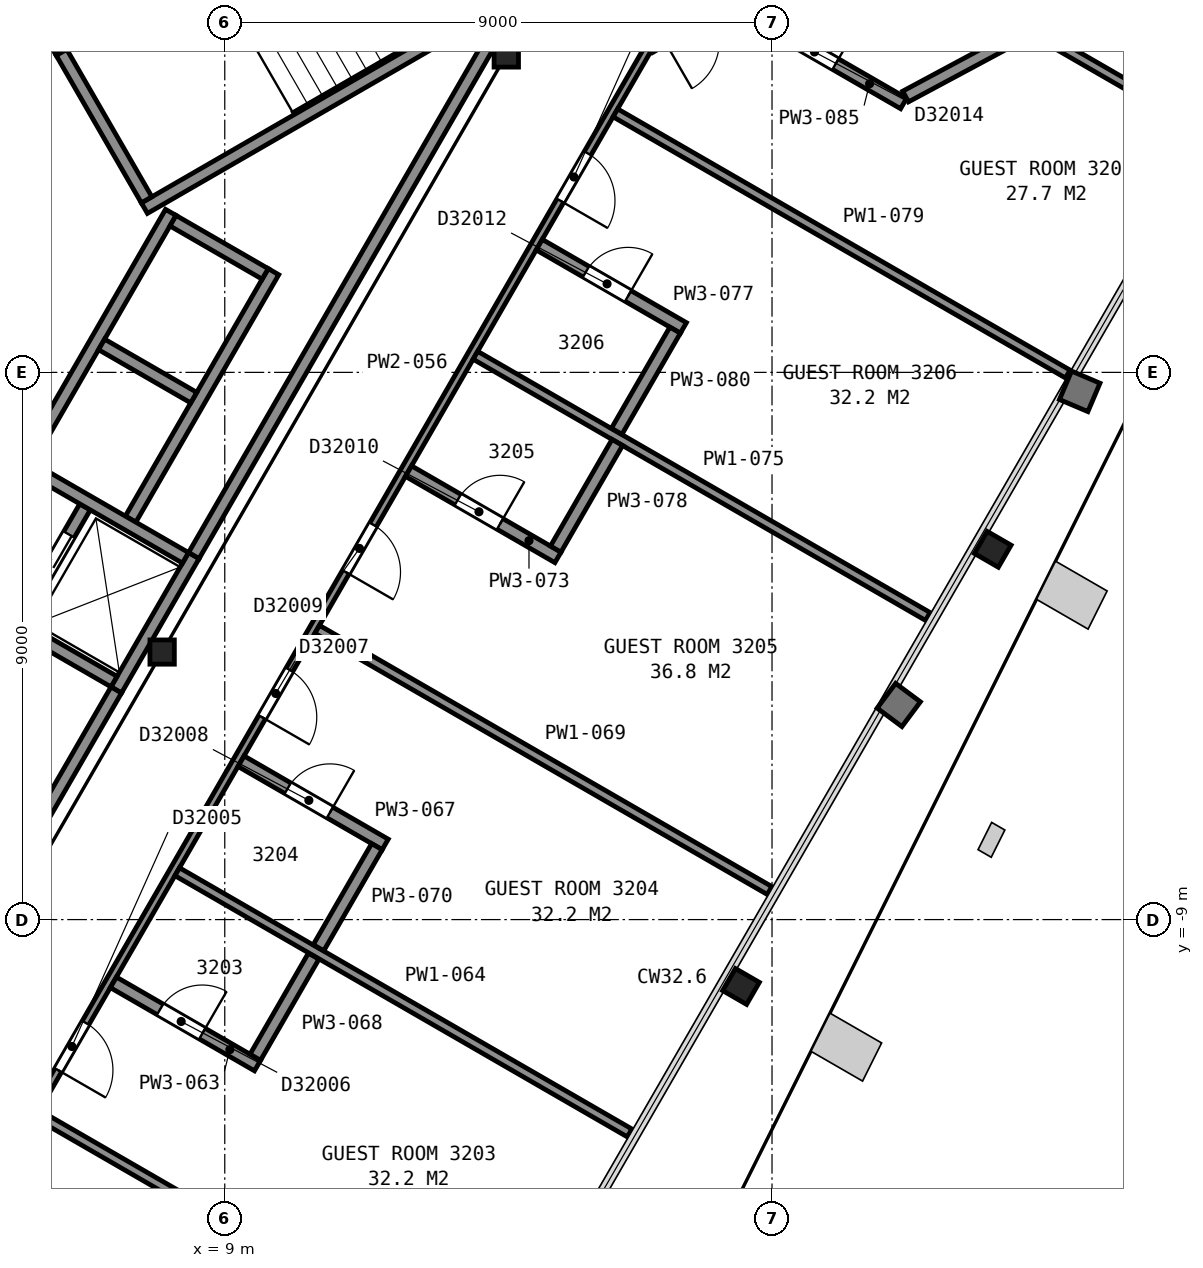
"""IFC4 building model, lengths in metres.
Left out: names, types, materials, properties, quantities, classifications, styles, units other than length and angle.
Written with IfcOpenShell. Run it as: python <this file> out.ifc"""

import sys

from ifc_helpers import new_model, si_unit, direction, frame, frame_2d, origin, origin_2d, place, context, subcontext, project, spatial, rectangle, i_section, extrude, element, fill, save


model = new_model("IFC4")
c1 = context("Model", 3, precision=1e-05, world=origin(), true_north=direction((0.0, 1.0)))
c2 = subcontext(c1, "Body", "Model", "MODEL_VIEW")
j1 = project(units=[si_unit("LENGTHUNIT", "METRE"), si_unit("PLANEANGLEUNIT", "RADIAN")], contexts=[c1])
p1 = place(None, origin())
s1 = spatial("IfcSite", under=j1, at=p1, CompositionType="ELEMENT")
p2 = place(p1, origin())
s2 = spatial("IfcBuilding", under=s1, at=p2, CompositionType="ELEMENT")
p3 = place(p2, frame((0.0, 0.0, 132.4)))
s3 = spatial("IfcBuildingStorey", under=s2, at=p3, CompositionType="ELEMENT", Elevation=132.4)
p4 = place(p3, frame((17.49, -10.1, 0.035), z_axis=(0.0, 0.0, 1.0), x_axis=(-0.5, -0.866025403784, 0.0)))
e1 = element("IfcColumn", 1, at=p4, inside=s3, PredefinedType="COLUMN", context=c2, shape_type="SweptSolid", body=[
    extrude(i_section(OverallWidth=0.419, OverallDepth=0.455, WebThickness=0.042, FlangeThickness=0.068, FilletRadius=0.015, at=origin_2d()), origin(), (0.0, 0.0, 1.0), 3.565),
])
p5 = place(p3, frame((21.63, -2.91, 0.04), z_axis=(0.0, 0.0, 1.0), x_axis=(-0.5, -0.866025403784, 0.0)))
e2 = element("IfcColumn", 2, at=p5, inside=s3, PredefinedType="COLUMN", context=c2, shape_type="SweptSolid", body=[
    extrude(i_section(OverallWidth=0.419, OverallDepth=0.455, WebThickness=0.042, FlangeThickness=0.068, FilletRadius=0.015, at=origin_2d()), origin(), (0.0, 0.0, 1.0), 3.56),
])
for number, where, z_axis, x_axis in (
    (3, (13.63, 5.22, 0.0), (0.0, 0.0, 1.0), (1.0, 0.0, 0.0)),
    (4, (7.97, -4.6, 0.0), (0.0, 0.0, 1.0), (1.0, 0.0, 0.0)),
):
    element("IfcColumn", number, at=place(p3, frame(where, z_axis=z_axis, x_axis=x_axis)), inside=s3, PredefinedType="COLUMN", context=c2, shape_type="SweptSolid", body=[
        extrude(i_section(OverallWidth=0.401, OverallDepth=0.399, WebThickness=0.025, FlangeThickness=0.04, FilletRadius=0.015, at=origin_2d()), origin(), (0.0, 0.0, 1.0), 3.6),
    ])
for number, where, z_axis, x_axis in (
    (5, (6.178, 5.299, 0.0), (0.0, 0.0, 1.0), (0.866, 0.5, 0.0)),
    (6, (7.678, 2.701, 0.0), (0.0, 0.0, 1.0), (0.866, 0.5, 0.0)),
):
    element("IfcWall", number, at=place(p3, frame(where, z_axis=z_axis, x_axis=x_axis)), inside=s3, PredefinedType="PARTITIONING", context=c2, shape_type="SweptSolid", body=[
        extrude(rectangle(XDim=12.0, YDim=0.2, at=frame_2d((6.0, 0.0))), origin(), (0.0, 0.0, 1.0), 3.35),
    ])
p6 = place(p3, frame((7.715, 2.838, 0.0), z_axis=(0.0, 0.0, 1.0), x_axis=(-0.500049511043, 0.865996816683, 0.0)))
e7 = element("IfcWall", 7, at=p6, inside=s3, PredefinedType="PARTITIONING", context=c2, shape_type="SweptSolid", body=[
    extrude(rectangle(XDim=2.8, YDim=0.2, at=frame_2d((1.4, 0.0))), origin(), (0.0, 0.0, 1.0), 3.35),
])
p7 = place(p3, frame((7.216, -5.222, 0.0), z_axis=(0.0, 0.0, 1.0), x_axis=(0.499990435942, 0.866030925526, 0.0)))
e8 = element("IfcWall", 8, at=p7, inside=s3, PredefinedType="PARTITIONING", context=c2, shape_type="SweptSolid", body=[
    extrude(rectangle(XDim=2.55, YDim=0.2, at=frame_2d((1.275, 0.0))), origin(), (0.0, 0.0, 1.0), 3.6),
])
p8 = place(p3, frame((7.451, -2.414, 0.0), z_axis=(0.0, 0.0, 1.0), x_axis=(0.500016218704, 0.866016039709, 0.0)))
e9 = element("IfcWall", 9, at=p8, inside=s3, PredefinedType="PARTITIONING", context=c2, shape_type="SweptSolid", body=[
    extrude(rectangle(XDim=4.7, YDim=0.2, at=frame_2d((2.35, 0.0))), origin(), (0.0, 0.0, 1.0), 3.6),
])
p9 = place(p3, frame((5.527, -4.247, 0.0), z_axis=(0.0, 0.0, 1.0), x_axis=(0.499938297808, 0.866061024631, 0.0)))
e10 = element("IfcWall", 10, at=p9, inside=s3, PredefinedType="PARTITIONING", context=c2, shape_type="SweptSolid", body=[
    extrude(rectangle(XDim=2.35, YDim=0.2, at=frame_2d((1.175, 0.0))), origin(), (0.0, 0.0, 1.0), 3.6),
])
p10 = place(p9, frame((0.725, 0.0, 0.0)))
e11 = element("IfcOpeningElement", 11, at=p10, cuts=e10, PredefinedType="OPENING", context=c2, shape_type="SweptSolid", body=[
    extrude(rectangle(XDim=1.1, YDim=2.1, at=frame_2d((0.55, 1.05))), frame((0.0, 0.11, 0.0), z_axis=(0.0, -1.0, 0.0), x_axis=(1.0, 0.0, 0.0)), (0.0, 0.0, 1.0), 0.22),
])
p11 = place(p3, frame((5.663, -1.612, 0.0), z_axis=(0.0, 0.0, 1.0), x_axis=(0.49998122708, 0.866036242063, 0.0)))
e12 = element("IfcWall", 12, at=p11, inside=s3, PredefinedType="PARTITIONING", context=c2, shape_type="SweptSolid", body=[
    extrude(rectangle(XDim=4.9, YDim=0.2, at=frame_2d((2.45, 0.0))), origin(), (0.0, 0.0, 1.0), 3.6),
])
p12 = place(p3, frame((9.665, 1.62, 0.0), z_axis=(0.0, 0.0, 1.0), x_axis=(-0.866002029911, 0.500040482552, 0.0)))
e13 = element("IfcWall", 13, at=p12, inside=s3, PredefinedType="PARTITIONING", context=c2, shape_type="SweptSolid", body=[
    extrude(rectangle(XDim=1.75, YDim=0.2, at=frame_2d((0.875, 0.0))), origin(), (0.0, 0.0, 1.0), 3.6),
])
p13 = place(p3, frame((8.49, -0.416, 0.0), z_axis=(0.0, 0.0, 1.0), x_axis=(-0.866036909293, 0.499980071345, 0.0)))
e14 = element("IfcWall", 14, at=p13, inside=s3, PredefinedType="PARTITIONING", context=c2, shape_type="SweptSolid", body=[
    extrude(rectangle(XDim=1.75, YDim=0.2, at=frame_2d((0.875, 0.0))), origin(), (0.0, 0.0, 1.0), 3.6),
])
p14 = place(p3, frame((8.354, -3.051, 0.0), z_axis=(0.0, 0.0, 1.0), x_axis=(-0.866060182126, 0.499939757307, 0.0)))
e15 = element("IfcWall", 15, at=p14, inside=s3, PredefinedType="PARTITIONING", context=c2, shape_type="SweptSolid", body=[
    extrude(rectangle(XDim=2.95, YDim=0.2, at=frame_2d((1.475, 0.0))), origin(), (0.0, 0.0, 1.0), 3.6),
])
p15 = place(p3, frame((7.179, -5.086, 0.0), z_axis=(0.0, 0.0, 1.0), x_axis=(-0.866036909293, 0.499980071345, 0.0)))
e16 = element("IfcWall", 16, at=p15, inside=s3, PredefinedType="PARTITIONING", context=c2, shape_type="SweptSolid", body=[
    extrude(rectangle(XDim=1.75, YDim=0.2, at=frame_2d((0.875, 0.0))), origin(), (0.0, 0.0, 1.0), 3.6),
])
p16 = place(p3, frame((5.906, -7.49, 0.0), z_axis=(0.0, 0.0, 1.0), x_axis=(0.500252727967, 0.865879442048, 0.0)))
e17 = element("IfcWall", 17, at=p16, inside=s3, PredefinedType="PARTITIONING", context=c2, shape_type="SweptSolid", body=[
    extrude(rectangle(XDim=2.617, YDim=0.2, at=frame_2d((1.309, 0.0))), origin(), (0.0, 0.0, 1.0), 3.35),
])
p17 = place(p3, frame((8.492, -3.012, 0.0), z_axis=(0.0, 0.0, 1.0), x_axis=(0.499972957231, 0.866041016371, 0.0)))
e18 = element("IfcWall", 18, at=p17, inside=s3, PredefinedType="PARTITIONING", context=c2, shape_type="SweptSolid", body=[
    extrude(rectangle(XDim=10.349, YDim=0.2, at=frame_2d((5.174, 0.0))), origin(), (0.0, 0.0, 1.0), 3.35),
])
p18 = place(p3, frame((15.962, 5.326, 0.0), z_axis=(0.0, 0.0, 1.0), x_axis=(-0.499992829944, -0.866029543379, 0.0)))
e19 = element("IfcWall", 19, at=p18, inside=s3, PredefinedType="PARTITIONING", context=c2, shape_type="SweptSolid", body=[
    extrude(rectangle(XDim=24.413, YDim=0.125, at=frame_2d((12.207, 0.0))), origin(), (0.0, 0.0, 1.0), 2.613),
])
p19 = place(p18, frame((21.258, 0.0, 0.0)))
e20 = element("IfcOpeningElement", 20, at=p19, cuts=e19, PredefinedType="OPENING", context=c2, shape_type="SweptSolid", body=[
    extrude(rectangle(XDim=0.9, YDim=2.1, at=frame_2d((0.45, 1.05))), frame((0.0, 0.073, 0.0), z_axis=(0.0, -1.0, 0.0), x_axis=(1.0, 0.0, 0.0)), (0.0, 0.0, 1.0), 0.145),
])
p20 = place(p18, frame((18.502, 0.0, 0.0)))
e21 = element("IfcOpeningElement", 21, at=p20, cuts=e19, PredefinedType="OPENING", context=c2, shape_type="SweptSolid", body=[
    extrude(rectangle(XDim=0.9, YDim=2.1, at=frame_2d((0.45, 1.05))), frame((0.0, 0.073, 0.0), z_axis=(0.0, -1.0, 0.0), x_axis=(1.0, 0.0, 0.0)), (0.0, 0.0, 1.0), 0.145),
])
p21 = place(p18, frame((11.799, 0.0, 0.0)))
e22 = element("IfcOpeningElement", 22, at=p21, cuts=e19, PredefinedType="OPENING", context=c2, shape_type="SweptSolid", body=[
    extrude(rectangle(XDim=0.9, YDim=2.1, at=frame_2d((0.45, 1.05))), frame((0.0, 0.073, 0.0), z_axis=(0.0, -1.0, 0.0), x_axis=(1.0, 0.0, 0.0)), (0.0, 0.0, 1.0), 0.145),
])
p22 = place(p18, frame((9.043, 0.0, 0.0)))
e23 = element("IfcOpeningElement", 23, at=p22, cuts=e19, PredefinedType="OPENING", context=c2, shape_type="SweptSolid", body=[
    extrude(rectangle(XDim=0.9, YDim=2.1, at=frame_2d((0.45, 1.05))), frame((0.0, 0.073, 0.0), z_axis=(0.0, -1.0, 0.0), x_axis=(1.0, 0.0, 0.0)), (0.0, 0.0, 1.0), 0.145),
])
p23 = place(p18, frame((1.99, 0.0, 0.0)))
e24 = element("IfcOpeningElement", 24, at=p23, cuts=e19, PredefinedType="OPENING", context=c2, shape_type="SweptSolid", body=[
    extrude(rectangle(XDim=0.9, YDim=2.1, at=frame_2d((0.45, 1.05))), frame((0.0, 0.073, 0.0), z_axis=(0.0, -1.0, 0.0), x_axis=(1.0, 0.0, 0.0)), (0.0, 0.0, 1.0), 0.145),
])
p24 = place(p3, frame((5.916, -12.201, 0.0), z_axis=(0.0, 0.0, 1.0), x_axis=(0.865995804368, -0.50005126419, 0.0)))
e25 = element("IfcWall", 25, at=p24, inside=s3, PredefinedType="PARTITIONING", context=c2, shape_type="SweptSolid", body=[
    extrude(rectangle(XDim=8.591, YDim=0.15, at=frame_2d((4.295, 0.0))), origin(), (0.0, 0.0, 1.0), 2.613),
])
p25 = place(p3, frame((7.168, -10.032, 0.0), z_axis=(0.0, 0.0, 1.0), x_axis=(0.86596722502, -0.50010075504, 0.0)))
e26 = element("IfcWall", 26, at=p25, inside=s3, PredefinedType="PARTITIONING", context=c2, shape_type="SweptSolid", body=[
    extrude(rectangle(XDim=2.737, YDim=0.2, at=frame_2d((1.369, 0.0))), origin(), (0.0, 0.0, 1.0), 2.613),
])
p26 = place(p25, frame((0.887, 0.0, 0.0)))
e27 = element("IfcOpeningElement", 27, at=p26, cuts=e26, PredefinedType="OPENING", context=c2, shape_type="SweptSolid", body=[
    extrude(rectangle(XDim=0.8, YDim=2.1, at=frame_2d((0.4, 1.05))), frame((0.0, 0.11, 0.0), z_axis=(0.0, -1.0, 0.0), x_axis=(1.0, 0.0, 0.0)), (0.0, 0.0, 1.0), 0.22),
])
p27 = place(p3, frame((8.218, -8.213, 0.0), z_axis=(0.0, 0.0, 1.0), x_axis=(0.865997709989, -0.500047963993, 0.0)))
e28 = element("IfcWall", 28, at=p27, inside=s3, PredefinedType="PARTITIONING", context=c2, shape_type="SweptSolid", body=[
    extrude(rectangle(XDim=8.592, YDim=0.15, at=frame_2d((4.296, 0.0))), origin(), (0.0, 0.0, 1.0), 2.613),
])
p28 = place(p3, frame((11.639, -7.764, 0.0), z_axis=(0.0, 0.0, 1.0), x_axis=(-0.866028150195, 0.499995243048, 0.0)))
e29 = element("IfcWall", 29, at=p28, inside=s3, PredefinedType="PARTITIONING", context=c2, shape_type="SweptSolid", body=[
    extrude(rectangle(XDim=2.737, YDim=0.2, at=frame_2d((1.369, 0.0))), origin(), (0.0, 0.0, 1.0), 2.613),
])
p29 = place(p28, frame((1.05, 0.0, 0.0)))
e30 = element("IfcOpeningElement", 30, at=p29, cuts=e29, PredefinedType="OPENING", context=c2, shape_type="SweptSolid", body=[
    extrude(rectangle(XDim=0.8, YDim=2.1, at=frame_2d((0.4, 1.05))), frame((0.0, 0.11, 0.0), z_axis=(0.0, -1.0, 0.0), x_axis=(1.0, 0.0, 0.0)), (0.0, 0.0, 1.0), 0.22),
])
p30 = place(p3, frame((9.502, -11.264, 0.0), z_axis=(0.0, 0.0, 1.0), x_axis=(0.499887618105, 0.86609027778, 0.0)))
e31 = element("IfcWall", 31, at=p30, inside=s3, PredefinedType="PARTITIONING", context=c2, shape_type="SweptSolid", body=[
    extrude(rectangle(XDim=1.919, YDim=0.2, at=frame_2d((0.96, 0.0))), origin(), (0.0, 0.0, 1.0), 2.613),
])
p31 = place(p3, frame((10.52, -4.226, 0.0), z_axis=(0.0, 0.0, 1.0), x_axis=(0.866002910178, -0.500038958046, 0.0)))
e32 = element("IfcWall", 32, at=p31, inside=s3, PredefinedType="PARTITIONING", context=c2, shape_type="SweptSolid", body=[
    extrude(rectangle(XDim=8.591, YDim=0.15, at=frame_2d((4.295, 0.0))), origin(), (0.0, 0.0, 1.0), 2.613),
])
p32 = place(p3, frame((10.542, -9.463, 0.0), z_axis=(0.0, 0.0, 1.0), x_axis=(0.500214044309, 0.865901789971, 0.0)))
e33 = element("IfcWall", 33, at=p32, inside=s3, PredefinedType="PARTITIONING", context=c2, shape_type="SweptSolid", body=[
    extrude(rectangle(XDim=1.92, YDim=0.2, at=frame_2d((0.96, 0.0))), origin(), (0.0, 0.0, 1.0), 2.613),
])
p33 = place(p3, frame((12.022, -1.624, 0.0), z_axis=(0.0, 0.0, 1.0), x_axis=(0.866026538634, -0.499998034377, 0.0)))
e34 = element("IfcWall", 34, at=p33, inside=s3, PredefinedType="PARTITIONING", context=c2, shape_type="SweptSolid", body=[
    extrude(rectangle(XDim=2.837, YDim=0.2, at=frame_2d((1.419, 0.0))), origin(), (0.0, 0.0, 1.0), 2.613),
])
p34 = place(p33, frame((0.938, 0.0, 0.0)))
e35 = element("IfcOpeningElement", 35, at=p34, cuts=e34, PredefinedType="OPENING", context=c2, shape_type="SweptSolid", body=[
    extrude(rectangle(XDim=0.8, YDim=2.1, at=frame_2d((0.4, 1.05))), frame((0.0, 0.11, 0.0), z_axis=(0.0, -1.0, 0.0), x_axis=(1.0, 0.0, 0.0)), (0.0, 0.0, 1.0), 0.22),
])
p35 = place(p3, frame((13.122, 0.281, 0.0), z_axis=(0.0, 0.0, 1.0), x_axis=(0.866029425019, -0.499993034952, 0.0)))
e36 = element("IfcWall", 36, at=p35, inside=s3, PredefinedType="PARTITIONING", context=c2, shape_type="SweptSolid", body=[
    extrude(rectangle(XDim=8.591, YDim=0.15, at=frame_2d((4.296, 0.0))), origin(), (0.0, 0.0, 1.0), 2.613),
])
p36 = place(p3, frame((16.542, 0.731, 0.0), z_axis=(0.0, 0.0, 1.0), x_axis=(-0.86596722502, 0.50010075504, 0.0)))
e37 = element("IfcWall", 37, at=p36, inside=s3, PredefinedType="PARTITIONING", context=c2, shape_type="SweptSolid", body=[
    extrude(rectangle(XDim=2.737, YDim=0.2, at=frame_2d((1.369, 0.0))), origin(), (0.0, 0.0, 1.0), 2.613),
])
p37 = place(p36, frame((1.05, 0.0, 0.0)))
e38 = element("IfcOpeningElement", 38, at=p37, cuts=e37, PredefinedType="OPENING", context=c2, shape_type="SweptSolid", body=[
    extrude(rectangle(XDim=0.8, YDim=2.1, at=frame_2d((0.4, 1.05))), frame((0.0, 0.11, 0.0), z_axis=(0.0, -1.0, 0.0), x_axis=(1.0, 0.0, 0.0)), (0.0, 0.0, 1.0), 0.22),
])
p38 = place(p3, frame((14.443, -2.906, 0.0), z_axis=(0.0, 0.0, 1.0), x_axis=(0.500042536776, 0.866000843773, 0.0)))
e39 = element("IfcWall", 39, at=p38, inside=s3, PredefinedType="PARTITIONING", context=c2, shape_type="SweptSolid", body=[
    extrude(rectangle(XDim=2.025, YDim=0.2, at=frame_2d((1.012, 0.0))), origin(), (0.0, 0.0, 1.0), 2.613),
])
p39 = place(p3, frame((15.424, 4.268, 0.0), z_axis=(0.0, 0.0, 1.0), x_axis=(0.866022320763, -0.500005339912, 0.0)))
e40 = element("IfcWall", 40, at=p39, inside=s3, PredefinedType="PARTITIONING", context=c2, shape_type="SweptSolid", body=[
    extrude(rectangle(XDim=8.591, YDim=0.15, at=frame_2d((4.296, 0.0))), origin(), (0.0, 0.0, 1.0), 2.613),
])
p40 = place(p3, frame((15.446, -0.969, 0.0), z_axis=(0.0, 0.0, 1.0), x_axis=(0.499913221443, 0.866075499611, 0.0)))
e41 = element("IfcWall", 41, at=p40, inside=s3, PredefinedType="PARTITIONING", context=c2, shape_type="SweptSolid", body=[
    extrude(rectangle(XDim=1.92, YDim=0.2, at=frame_2d((0.96, 0.0))), origin(), (0.0, 0.0, 1.0), 2.613),
])
p41 = place(p3, frame((19.278, 7.204, 0.0), z_axis=(0.0, 0.0, 1.0), x_axis=(-0.866028547684, -0.499994554566, 0.0)))
e42 = element("IfcWall", 42, at=p41, inside=s3, PredefinedType="PARTITIONING", context=c2, shape_type="SweptSolid", body=[
    extrude(rectangle(XDim=3.78, YDim=0.125, at=frame_2d((1.89, 0.0))), origin(), (0.0, 0.0, 1.0), 2.613),
])
p42 = place(p41, frame((2.615, 0.0, 0.0)))
e43 = element("IfcOpeningElement", 43, at=p42, cuts=e42, PredefinedType="OPENING", context=c2, shape_type="SweptSolid", body=[
    extrude(rectangle(XDim=0.9, YDim=2.1, at=frame_2d((0.45, 1.05))), frame((0.0, 0.073, 0.0), z_axis=(0.0, -1.0, 0.0), x_axis=(1.0, 0.0, 0.0)), (0.0, 0.0, 1.0), 0.145),
])
p43 = place(p3, frame((17.425, 6.004, 0.0), z_axis=(0.0, 0.0, 1.0), x_axis=(0.866145753309, -0.499791490549, 0.0)))
e44 = element("IfcWall", 44, at=p43, inside=s3, PredefinedType="PARTITIONING", context=c2, shape_type="SweptSolid", body=[
    extrude(rectangle(XDim=3.163, YDim=0.2, at=frame_2d((1.582, 0.0))), origin(), (0.0, 0.0, 1.0), 2.613),
])
p44 = place(p43, frame((1.07, 0.0, 0.0)))
e45 = element("IfcOpeningElement", 45, at=p44, cuts=e44, PredefinedType="OPENING", context=c2, shape_type="SweptSolid", body=[
    extrude(rectangle(XDim=0.8, YDim=2.1, at=frame_2d((0.4, 1.05))), frame((0.0, 0.11, 0.0), z_axis=(0.0, -1.0, 0.0), x_axis=(1.0, 0.0, 0.0)), (0.0, 0.0, 1.0), 0.22),
])
p45 = place(p3, frame((19.822, 7.046, 0.0), z_axis=(0.0, 0.0, 1.0), x_axis=(0.866041323853, -0.499972424619, 0.0)))
e46 = element("IfcWall", 46, at=p45, inside=s3, PredefinedType="PARTITIONING", context=c2, shape_type="SweptSolid", body=[
    extrude(rectangle(XDim=6.172, YDim=0.15, at=frame_2d((3.086, 0.0))), origin(), (0.0, 0.0, 1.0), 2.613),
])
p46 = place(p3, frame((20.197, 4.537, 0.0), z_axis=(0.0, 0.0, 1.0), x_axis=(0.881162538645, 0.472813473253, 0.0)))
e47 = element("IfcWall", 47, at=p46, inside=s3, PredefinedType="PARTITIONING", context=c2, shape_type="SweptSolid", body=[
    extrude(rectangle(XDim=2.185, YDim=0.2, at=frame_2d((1.093, 0.0))), origin(), (0.0, 0.0, 1.0), 2.613),
])
p47 = place(p10, origin())
e48 = element("IfcDoor", 48, at=p47, inside=s3, OperationType="SLIDING_TO_LEFT", PredefinedType="DOOR", context=c2, shape_type="SweptSolid", body=[
    extrude(rectangle(XDim=1.1, YDim=2.1, at=frame_2d((0.55, 1.05))), frame((0.0, 0.025, 0.0), z_axis=(0.0, -1.0, 0.0), x_axis=(1.0, 0.0, 0.0)), (0.0, 0.0, 1.0), 0.05),
])
fill(e11, e48)
p48 = place(p20, origin())
e49 = element("IfcDoor", 49, at=p48, inside=s3, OperationType="SINGLE_SWING_RIGHT", PredefinedType="DOOR", context=c2, shape_type="SweptSolid", body=[
    extrude(rectangle(XDim=0.9, YDim=2.1, at=frame_2d((0.45, 1.05))), frame((0.0, 0.025, 0.0), z_axis=(0.0, -1.0, 0.0), x_axis=(1.0, 0.0, 0.0)), (0.0, 0.0, 1.0), 0.05),
])
fill(e21, e49)
p49 = place(p21, origin())
e50 = element("IfcDoor", 50, at=p49, inside=s3, OperationType="SINGLE_SWING_RIGHT", PredefinedType="DOOR", context=c2, shape_type="SweptSolid", body=[
    extrude(rectangle(XDim=0.9, YDim=2.1, at=frame_2d((0.45, 1.05))), frame((0.0, 0.025, 0.0), z_axis=(0.0, -1.0, 0.0), x_axis=(1.0, 0.0, 0.0)), (0.0, 0.0, 1.0), 0.05),
])
fill(e22, e50)
p50 = place(p22, origin())
e51 = element("IfcDoor", 51, at=p50, inside=s3, OperationType="SINGLE_SWING_RIGHT", PredefinedType="DOOR", context=c2, shape_type="SweptSolid", body=[
    extrude(rectangle(XDim=0.9, YDim=2.1, at=frame_2d((0.45, 1.05))), frame((0.0, 0.025, 0.0), z_axis=(0.0, -1.0, 0.0), x_axis=(1.0, 0.0, 0.0)), (0.0, 0.0, 1.0), 0.05),
])
fill(e23, e51)
p51 = place(p23, origin())
e52 = element("IfcDoor", 52, at=p51, inside=s3, OperationType="SINGLE_SWING_RIGHT", PredefinedType="DOOR", context=c2, shape_type="SweptSolid", body=[
    extrude(rectangle(XDim=0.9, YDim=2.1, at=frame_2d((0.45, 1.05))), frame((0.0, 0.025, 0.0), z_axis=(0.0, -1.0, 0.0), x_axis=(1.0, 0.0, 0.0)), (0.0, 0.0, 1.0), 0.05),
])
fill(e24, e52)
p52 = place(p26, origin())
e53 = element("IfcDoor", 53, at=p52, inside=s3, OperationType="SINGLE_SWING_RIGHT", PredefinedType="DOOR", context=c2, shape_type="SweptSolid", body=[
    extrude(rectangle(XDim=0.8, YDim=2.1, at=frame_2d((0.4, 1.05))), frame((0.0, 0.025, 0.0), z_axis=(0.0, -1.0, 0.0), x_axis=(1.0, 0.0, 0.0)), (0.0, 0.0, 1.0), 0.05),
])
fill(e27, e53)
p53 = place(p29, origin())
e54 = element("IfcDoor", 54, at=p53, inside=s3, OperationType="SINGLE_SWING_LEFT", PredefinedType="DOOR", context=c2, shape_type="SweptSolid", body=[
    extrude(rectangle(XDim=0.8, YDim=2.1, at=frame_2d((0.4, 1.05))), frame((0.0, 0.025, 0.0), z_axis=(0.0, -1.0, 0.0), x_axis=(1.0, 0.0, 0.0)), (0.0, 0.0, 1.0), 0.05),
])
fill(e30, e54)
p54 = place(p34, origin())
e55 = element("IfcDoor", 55, at=p54, inside=s3, OperationType="SINGLE_SWING_RIGHT", PredefinedType="DOOR", context=c2, shape_type="SweptSolid", body=[
    extrude(rectangle(XDim=0.8, YDim=2.1, at=frame_2d((0.4, 1.05))), frame((0.0, 0.025, 0.0), z_axis=(0.0, -1.0, 0.0), x_axis=(1.0, 0.0, 0.0)), (0.0, 0.0, 1.0), 0.05),
])
fill(e35, e55)
p55 = place(p37, origin())
e56 = element("IfcDoor", 56, at=p55, inside=s3, OperationType="SINGLE_SWING_LEFT", PredefinedType="DOOR", context=c2, shape_type="SweptSolid", body=[
    extrude(rectangle(XDim=0.8, YDim=2.1, at=frame_2d((0.4, 1.05))), frame((0.0, 0.025, 0.0), z_axis=(0.0, -1.0, 0.0), x_axis=(1.0, 0.0, 0.0)), (0.0, 0.0, 1.0), 0.05),
])
fill(e38, e56)
p56 = place(p44, origin())
e57 = element("IfcDoor", 57, at=p56, inside=s3, OperationType="SINGLE_SWING_RIGHT", PredefinedType="DOOR", context=c2, shape_type="SweptSolid", body=[
    extrude(rectangle(XDim=0.8, YDim=2.1, at=frame_2d((0.4, 1.05))), frame((0.0, 0.025, 0.0), z_axis=(0.0, -1.0, 0.0), x_axis=(1.0, 0.0, 0.0)), (0.0, 0.0, 1.0), 0.05),
])
fill(e45, e57)
save(model, sys.argv[1])
